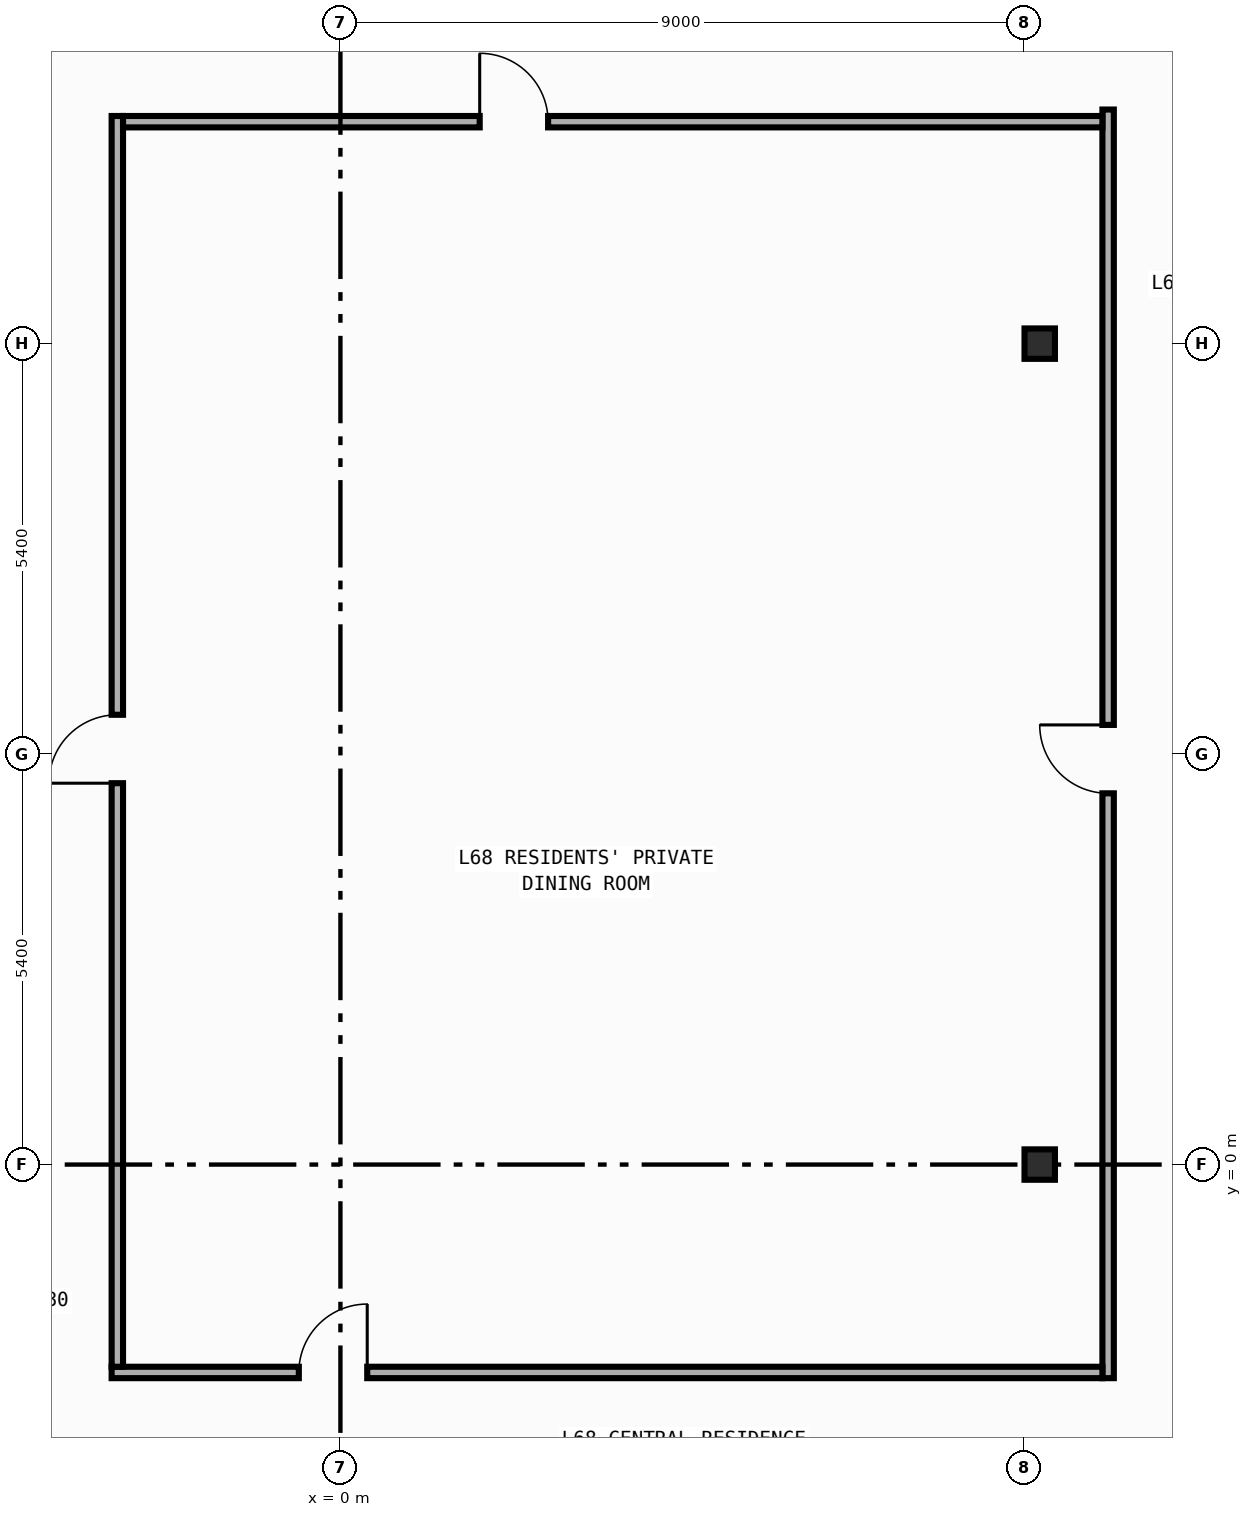
"""IFC4 building model, lengths in metres.
Left out: names, types, materials, properties, quantities, classifications, styles, units other than length and angle.
Written with IfcOpenShell. Run it as: python <this file> out.ifc"""

import sys

from ifc_helpers import new_model, si_unit, direction, frame, frame_2d, origin, origin_2d, place, context, subcontext, project, spatial, rectangle, i_section, extrude, element, fill, save


model = new_model("IFC4")
c1 = context("Model", 3, precision=1e-05, world=origin(), true_north=direction((0.0, 1.0)))
c2 = subcontext(c1, "Body", "Model", "MODEL_VIEW")
j1 = project(units=[si_unit("LENGTHUNIT", "METRE"), si_unit("PLANEANGLEUNIT", "RADIAN")], contexts=[c1])
p1 = place(None, origin())
s1 = spatial("IfcSite", under=j1, at=p1, CompositionType="ELEMENT")
p2 = place(p1, origin())
s2 = spatial("IfcBuilding", under=s1, at=p2, CompositionType="ELEMENT")
p3 = place(p2, frame((0.0, 0.0, 285.2)))
s3 = spatial("IfcBuildingStorey", under=s2, at=p3, CompositionType="ELEMENT", Elevation=285.2)
for number, where, z_axis, x_axis in (
    (1, (9.2, 0.0, 0.0), (0.0, 0.0, 1.0), (1.0, 0.0, 0.0)),
    (2, (9.2, 10.8, 0.0), (0.0, 0.0, 1.0), (1.0, 0.0, 0.0)),
):
    element("IfcColumn", number, at=place(p3, frame(where, z_axis=z_axis, x_axis=x_axis)), inside=s3, PredefinedType="COLUMN", context=c2, shape_type="SweptSolid", body=[
        extrude(i_section(OverallWidth=0.4, OverallDepth=0.4, WebThickness=0.013, FlangeThickness=0.021, FilletRadius=0.022, at=origin_2d()), origin(), (0.0, 0.0, 1.0), 3.8),
    ])
p4 = place(p3, frame((10.1, -2.81, 0.0), z_axis=(0.0, 0.0, 1.0), x_axis=(0.0, 1.0, 0.0)))
e3 = element("IfcWall", 3, at=p4, inside=s3, PredefinedType="PARTITIONING", context=c2, shape_type="SweptSolid", body=[
    extrude(rectangle(XDim=16.69, YDim=0.15, at=frame_2d((8.345, 0.0))), origin(), (0.0, 0.0, 1.0), 3.54),
])
p5 = place(p4, frame((7.694, 0.0, 0.0)))
e4 = element("IfcOpeningElement", 4, at=p5, cuts=e3, PredefinedType="OPENING", context=c2, shape_type="SweptSolid", body=[
    extrude(rectangle(XDim=0.9, YDim=2.15, at=frame_2d((0.45, 1.075))), frame((0.0, 0.085, 0.0), z_axis=(0.0, -1.0, 0.0), x_axis=(1.0, 0.0, 0.0)), (0.0, 0.0, 1.0), 0.17),
])
p6 = place(p3, frame((-3.01, -2.735, 0.0), z_axis=(0.0, 0.0, 1.0), x_axis=(1.0, 0.0, 0.0)))
e5 = element("IfcWall", 5, at=p6, inside=s3, PredefinedType="PARTITIONING", context=c2, shape_type="SweptSolid", body=[
    extrude(rectangle(XDim=13.035, YDim=0.15, at=frame_2d((6.518, 0.0))), origin(), (0.0, 0.0, 1.0), 3.54),
])
p7 = place(p6, frame((2.463, 0.0, 0.0)))
e6 = element("IfcOpeningElement", 6, at=p7, cuts=e5, PredefinedType="OPENING", context=c2, shape_type="SweptSolid", body=[
    extrude(rectangle(XDim=0.9, YDim=2.15, at=frame_2d((0.45, 1.075))), frame((0.0, 0.085, 0.0), z_axis=(0.0, -1.0, 0.0), x_axis=(1.0, 0.0, 0.0)), (0.0, 0.0, 1.0), 0.17),
])
p8 = place(p3, frame((-2.935, -2.66, 0.0), z_axis=(0.0, 0.0, 1.0), x_axis=(0.0, 1.0, 0.0)))
e7 = element("IfcWall", 7, at=p8, inside=s3, PredefinedType="PARTITIONING", context=c2, shape_type="SweptSolid", body=[
    extrude(rectangle(XDim=16.455, YDim=0.15, at=frame_2d((8.228, 0.0))), origin(), (0.0, 0.0, 1.0), 3.54),
])
p9 = place(p8, frame((7.677, 0.0, 0.0)))
e8 = element("IfcOpeningElement", 8, at=p9, cuts=e7, PredefinedType="OPENING", context=c2, shape_type="SweptSolid", body=[
    extrude(rectangle(XDim=0.9, YDim=2.15, at=frame_2d((0.45, 1.075))), frame((0.0, 0.085, 0.0), z_axis=(0.0, -1.0, 0.0), x_axis=(1.0, 0.0, 0.0)), (0.0, 0.0, 1.0), 0.17),
])
p10 = place(p3, frame((-2.86, 13.72, 0.0), z_axis=(0.0, 0.0, 1.0), x_axis=(1.0, 0.0, 0.0)))
e9 = element("IfcWall", 9, at=p10, inside=s3, PredefinedType="PARTITIONING", context=c2, shape_type="SweptSolid", body=[
    extrude(rectangle(XDim=12.885, YDim=0.15, at=frame_2d((6.442, 0.0))), origin(), (0.0, 0.0, 1.0), 3.54),
])
p11 = place(p10, frame((4.692, 0.0, 0.0)))
e10 = element("IfcOpeningElement", 10, at=p11, cuts=e9, PredefinedType="OPENING", context=c2, shape_type="SweptSolid", body=[
    extrude(rectangle(XDim=0.9, YDim=2.15, at=frame_2d((0.45, 1.075))), frame((0.0, 0.085, 0.0), z_axis=(0.0, -1.0, 0.0), x_axis=(1.0, 0.0, 0.0)), (0.0, 0.0, 1.0), 0.17),
])
p12 = place(p5, origin())
e11 = element("IfcDoor", 11, at=p12, inside=s3, OperationType="SINGLE_SWING_RIGHT", PredefinedType="DOOR", context=c2, shape_type="SweptSolid", body=[
    extrude(rectangle(XDim=0.9, YDim=2.15, at=frame_2d((0.45, 1.075))), frame((0.0, 0.025, 0.0), z_axis=(0.0, -1.0, 0.0), x_axis=(1.0, 0.0, 0.0)), (0.0, 0.0, 1.0), 0.05),
])
fill(e4, e11)
p13 = place(p7, origin())
e12 = element("IfcDoor", 12, at=p13, inside=s3, OperationType="SINGLE_SWING_RIGHT", PredefinedType="DOOR", context=c2, shape_type="SweptSolid", body=[
    extrude(rectangle(XDim=0.9, YDim=2.15, at=frame_2d((0.45, 1.075))), frame((0.0, 0.025, 0.0), z_axis=(0.0, -1.0, 0.0), x_axis=(1.0, 0.0, 0.0)), (0.0, 0.0, 1.0), 0.05),
])
fill(e6, e12)
p14 = place(p9, origin())
e13 = element("IfcDoor", 13, at=p14, inside=s3, OperationType="SINGLE_SWING_LEFT", PredefinedType="DOOR", context=c2, shape_type="SweptSolid", body=[
    extrude(rectangle(XDim=0.9, YDim=2.15, at=frame_2d((0.45, 1.075))), frame((0.0, 0.025, 0.0), z_axis=(0.0, -1.0, 0.0), x_axis=(1.0, 0.0, 0.0)), (0.0, 0.0, 1.0), 0.05),
])
fill(e8, e13)
p15 = place(p11, origin())
e14 = element("IfcDoor", 14, at=p15, inside=s3, OperationType="SINGLE_SWING_LEFT", PredefinedType="DOOR", context=c2, shape_type="SweptSolid", body=[
    extrude(rectangle(XDim=0.9, YDim=2.15, at=frame_2d((0.45, 1.075))), frame((0.0, 0.025, 0.0), z_axis=(0.0, -1.0, 0.0), x_axis=(1.0, 0.0, 0.0)), (0.0, 0.0, 1.0), 0.05),
])
fill(e10, e14)
save(model, sys.argv[1])
